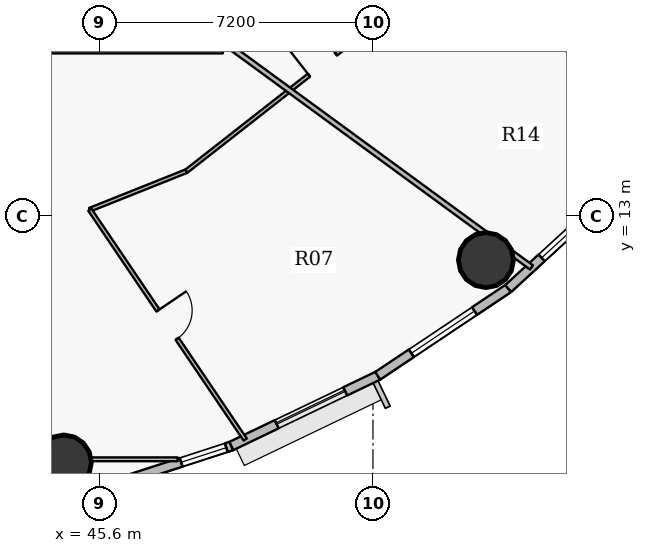
"""IFC4 building model, lengths in metres.
Left out: names, types, materials, properties, quantities, classifications, styles, units other than length and angle.
Written with IfcOpenShell. Run it as: python <this file> out.ifc"""

import sys

from ifc_helpers import new_model, si_unit, direction, frame, frame_2d, origin, origin_2d, place, context, subcontext, project, spatial, rectangle, hollow_circle, extrude, source, transform, mapped, element, fill, save


model = new_model("IFC4")
c1 = context("Model", 3, precision=1e-05, world=origin(), true_north=direction((0.0, 1.0)))
c2 = subcontext(c1, "Body", "Model", "MODEL_VIEW")
j1 = project(units=[si_unit("LENGTHUNIT", "METRE"), si_unit("PLANEANGLEUNIT", "RADIAN")], contexts=[c1])
p1 = place(None, origin())
s1 = spatial("IfcSite", under=j1, at=p1, CompositionType="ELEMENT")
p2 = place(p1, origin())
s2 = spatial("IfcBuilding", under=s1, at=p2, CompositionType="ELEMENT")
p3 = place(p2, frame((0.0, 0.0, 138.45)))
s3 = spatial("IfcBuildingStorey", under=s2, at=p3, CompositionType="ELEMENT", Elevation=138.45)
for number, where, z_axis, x_axis in (
    (1, (44.666, 6.519, 0.0), (0.0, 0.0, 1.0), (1.0, 0.0, 0.0)),
    (2, (55.773, 11.844, 0.0), (0.0, 0.0, 1.0), (1.0, 0.0, 0.0)),
):
    element("IfcColumn", number, at=place(p3, frame(where, z_axis=z_axis, x_axis=x_axis)), inside=s3, PredefinedType="COLUMN", context=c2, shape_type="SweptSolid", body=[
        extrude(hollow_circle(Radius=0.725, WallThickness=0.042, at=origin_2d()), origin(), (0.0, 0.0, 1.0), 3.75),
    ])
p4 = place(p3, frame((49.074, 6.953, 0.0), z_axis=(0.0, 0.0, 1.0), x_axis=(-0.951211346073, -0.308540070495, 0.0)))
e3 = element("IfcWall", 3, at=p4, inside=s3, PredefinedType="SOLIDWALL", context=c2, shape_type="SweptSolid", body=[
    extrude(rectangle(XDim=4.388, YDim=0.24, at=frame_2d((2.194, 0.0))), origin(), (0.0, 0.0, 1.0), 3.5),
])
p5 = place(p4, frame((0.14, 0.0, 0.9)))
e4 = element("IfcOpeningElement", 4, at=p5, cuts=e3, PredefinedType="OPENING", context=c2, shape_type="SweptSolid", body=[
    extrude(rectangle(XDim=1.25, YDim=1.65, at=origin_2d()), frame((0.625, 0.13, 0.825), z_axis=(0.0, -1.0, 0.0), x_axis=(1.0, 0.0, 0.0)), (0.0, 0.0, 1.0), 0.26),
])
p6 = place(p3, frame((52.925, 8.801, 0.0), z_axis=(0.0, 0.0, 1.0), x_axis=(-0.901589935876, -0.432591709962, 0.0)))
e5 = element("IfcWall", 5, at=p6, inside=s3, PredefinedType="SOLIDWALL", context=c2, shape_type="SweptSolid", body=[
    extrude(rectangle(XDim=4.272, YDim=0.24, at=frame_2d((2.136, 0.0))), origin(), (0.0, 0.0, 1.0), 3.5),
])
p7 = place(p6, frame((0.949, 0.0, 0.9)))
e6 = element("IfcOpeningElement", 6, at=p7, cuts=e5, PredefinedType="OPENING", context=c2, shape_type="SweptSolid", body=[
    extrude(rectangle(XDim=2.0, YDim=1.75, at=origin_2d()), frame((1.0, 0.13, 0.875), z_axis=(0.0, -1.0, 0.0), x_axis=(1.0, 0.0, 0.0)), (0.0, 0.0, 1.0), 0.26),
])
p8 = place(p3, frame((56.358, 11.097, 0.0), z_axis=(0.0, 0.0, 1.0), x_axis=(-0.831221811447, -0.555940914284, 0.0)))
e7 = element("IfcWall", 7, at=p8, inside=s3, PredefinedType="SOLIDWALL", context=c2, shape_type="SweptSolid", body=[
    extrude(rectangle(XDim=4.13, YDim=0.24, at=frame_2d((2.065, 0.0))), origin(), (0.0, 0.0, 1.0), 3.5),
])
p9 = place(p8, frame((1.065, 0.0, 0.9)))
e8 = element("IfcOpeningElement", 8, at=p9, cuts=e7, PredefinedType="OPENING", context=c2, shape_type="SweptSolid", body=[
    extrude(rectangle(XDim=2.0, YDim=1.75, at=origin_2d()), frame((1.0, 0.13, 0.875), z_axis=(0.0, -1.0, 0.0), x_axis=(1.0, 0.0, 0.0)), (0.0, 0.0, 1.0), 0.26),
])
p10 = place(p3, frame((59.289, 13.783, 0.0), z_axis=(0.0, 0.0, 1.0), x_axis=(-0.737113356241, -0.675769117414, 0.0)))
e9 = element("IfcWall", 9, at=p10, inside=s3, PredefinedType="SOLIDWALL", context=c2, shape_type="SweptSolid", body=[
    extrude(rectangle(XDim=3.976, YDim=0.24, at=frame_2d((1.988, 0.0))), origin(), (0.0, 0.0, 1.0), 3.5),
])
p11 = place(p10, frame((0.783, 0.0, 0.9)))
e10 = element("IfcOpeningElement", 10, at=p11, cuts=e9, PredefinedType="OPENING", context=c2, shape_type="SweptSolid", body=[
    extrude(rectangle(XDim=2.0, YDim=1.75, at=origin_2d()), frame((1.0, 0.13, 0.875), z_axis=(0.0, -1.0, 0.0), x_axis=(1.0, 0.0, 0.0)), (0.0, 0.0, 1.0), 0.26),
])
p12 = place(p3, frame((38.477, 17.35, 0.0), z_axis=(0.0, 0.0, 1.0), x_axis=(1.0, 0.0, 0.0)))
e11 = element("IfcWall", 11, at=p12, inside=s3, PredefinedType="PARTITIONING", context=c2, shape_type="SweptSolid", body=[
    extrude(rectangle(XDim=10.373, YDim=0.135, at=frame_2d((5.187, 0.0))), origin(), (0.0, 0.0, 1.0), 2.935),
])
p13 = place(p12, frame((4.687, 0.0, 0.0)))
e12 = element("IfcOpeningElement", 12, at=p13, cuts=e11, PredefinedType="OPENING", context=c2, shape_type="SweptSolid", body=[
    extrude(rectangle(XDim=1.0, YDim=2.15, at=origin_2d()), frame((0.5, 0.078, 1.075), z_axis=(0.0, -1.0, 0.0), x_axis=(1.0, 0.0, 0.0)), (0.0, 0.0, 1.0), 0.155),
])
p14 = place(p3, frame((41.208, 6.603, 0.0), z_axis=(0.0, 0.0, 1.0), x_axis=(1.0, 0.0, 0.0)))
e13 = element("IfcWall", 13, at=p14, inside=s3, PredefinedType="PARTITIONING", context=c2, shape_type="SweptSolid", body=[
    extrude(rectangle(XDim=6.453, YDim=0.1, at=frame_2d((3.227, 0.0))), origin(), (0.0, 0.0, 1.0), 2.935),
])
p15 = place(p14, frame((1.183, 0.0, 0.0)))
e14 = element("IfcOpeningElement", 14, at=p15, cuts=e13, PredefinedType="OPENING", context=c2, shape_type="SweptSolid", body=[
    extrude(rectangle(XDim=0.9, YDim=2.1, at=origin_2d()), frame((0.45, 0.06, 1.05), z_axis=(0.0, -1.0, 0.0), x_axis=(1.0, 0.0, 0.0)), (0.0, 0.0, 1.0), 0.12),
])
p16 = place(p3, frame((45.35, 13.17, 0.0), z_axis=(0.0, 0.0, 1.0), x_axis=(0.928802486491, 0.370575149044, 0.0)))
e15 = element("IfcWall", 15, at=p16, inside=s3, PredefinedType="PARTITIONING", context=c2, shape_type="SweptSolid", body=[
    extrude(rectangle(XDim=2.736, YDim=0.1, at=frame_2d((1.368, 0.0))), origin(), (0.0, 0.0, 1.0), 3.5),
])
p17 = place(p3, frame((45.35, 13.17, 0.0), z_axis=(0.0, 0.0, 1.0), x_axis=(0.560082631059, -0.828436748573, 0.0)))
e16 = element("IfcWall", 16, at=p17, inside=s3, PredefinedType="PARTITIONING", context=c2, shape_type="SweptSolid", body=[
    extrude(rectangle(XDim=7.301, YDim=0.1, at=frame_2d((3.65, 0.0))), origin(), (0.0, 0.0, 1.0), 2.935),
])
p18 = place(p17, frame((3.2, 0.0, 0.0)))
e17 = element("IfcOpeningElement", 17, at=p18, cuts=e16, PredefinedType="OPENING", context=c2, shape_type="SweptSolid", body=[
    extrude(rectangle(XDim=0.9, YDim=2.1, at=origin_2d()), frame((0.45, 0.06, 1.05), z_axis=(0.0, -1.0, 0.0), x_axis=(1.0, 0.0, 0.0)), (0.0, 0.0, 1.0), 0.12),
])
p19 = place(p3, frame((47.891, 14.184, 0.0), z_axis=(0.0, 0.0, 1.0), x_axis=(0.787333679705, 0.616527109544, 0.0)))
e18 = element("IfcWall", 18, at=p19, inside=s3, PredefinedType="PARTITIONING", context=c2, shape_type="SweptSolid", body=[
    extrude(rectangle(XDim=5.685, YDim=0.1, at=frame_2d((2.842, 0.0))), origin(), (0.0, 0.0, 1.0), 2.935),
])
p20 = place(p19, frame((4.096, 0.0, 0.0)))
e19 = element("IfcOpeningElement", 19, at=p20, cuts=e18, PredefinedType="OPENING", context=c2, shape_type="SweptSolid", body=[
    extrude(rectangle(XDim=0.9, YDim=2.1, at=origin_2d()), frame((0.45, 0.06, 1.05), z_axis=(0.0, -1.0, 0.0), x_axis=(1.0, 0.0, 0.0)), (0.0, 0.0, 1.0), 0.12),
])
p21 = place(p3, frame((48.85, 17.595, 0.0), z_axis=(0.0, 0.0, 1.0), x_axis=(0.806958414, -0.590608261096, 0.0)))
e20 = element("IfcWall", 20, at=p21, inside=s3, PredefinedType="PARTITIONING", context=c2, shape_type="SweptSolid", body=[
    extrude(rectangle(XDim=10.063, YDim=0.135, at=frame_2d((5.032, 0.0))), origin(), (0.0, 0.0, 1.0), 2.935),
])
p22 = place(p3, frame((53.442, 19.342, 0.0), z_axis=(0.0, 0.0, 1.0), x_axis=(0.91563160904, -0.402018353469, 0.0)))
e21 = element("IfcWall", 21, at=p22, inside=s3, PredefinedType="PARTITIONING", context=c2, shape_type="SweptSolid", body=[
    extrude(rectangle(XDim=8.294, YDim=0.1, at=frame_2d((4.147, 0.0))), origin(), (0.0, 0.0, 1.0), 2.935),
])
m1 = source(origin(), c2, "Body", "SweptSolid", [
    extrude(rectangle(XDim=2.0, YDim=1.75, at=origin_2d()), frame((1.0, 0.03, 0.875), z_axis=(0.0, -1.0, 0.0), x_axis=(1.0, 0.0, 0.0)), (0.0, 0.0, 1.0), 0.06),
])
p23 = place(p7, origin())
e22 = element("IfcWindow", 22, at=p23, inside=s3, PartitioningType="DOUBLE_PANEL_VERTICAL", PredefinedType="WINDOW", context=c2, shape_type="MappedRepresentation", body=[
    mapped(m1, transform((0.0, 0.0, 0.0), x_axis=(1.0, 0.0, 0.0), y_axis=(0.0, 1.0, 0.0), z_axis=(0.0, 0.0, 1.0), scale=1.0)),
])
fill(e6, e22)
p24 = place(p9, origin())
e23 = element("IfcWindow", 23, at=p24, inside=s3, PartitioningType="DOUBLE_PANEL_VERTICAL", PredefinedType="WINDOW", context=c2, shape_type="MappedRepresentation", body=[
    mapped(m1, transform((0.0, 0.0, 0.0), x_axis=(1.0, 0.0, 0.0), y_axis=(0.0, 1.0, 0.0), z_axis=(0.0, 0.0, 1.0), scale=1.0)),
])
fill(e8, e23)
p25 = place(p11, origin())
e24 = element("IfcWindow", 24, at=p25, inside=s3, PartitioningType="DOUBLE_PANEL_VERTICAL", PredefinedType="WINDOW", context=c2, shape_type="MappedRepresentation", body=[
    mapped(m1, transform((0.0, 0.0, 0.0), x_axis=(1.0, 0.0, 0.0), y_axis=(0.0, 1.0, 0.0), z_axis=(0.0, 0.0, 1.0), scale=1.0)),
])
fill(e10, e24)
m2 = source(origin(), c2, "Body", "SweptSolid", [
    extrude(rectangle(XDim=1.25, YDim=1.65, at=origin_2d()), frame((0.625, 0.03, 0.825), z_axis=(0.0, -1.0, 0.0), x_axis=(1.0, 0.0, 0.0)), (0.0, 0.0, 1.0), 0.06),
])
p26 = place(p5, origin())
e25 = element("IfcWindow", 25, at=p26, inside=s3, PartitioningType="SINGLE_PANEL", PredefinedType="WINDOW", context=c2, shape_type="MappedRepresentation", body=[
    mapped(m2, transform((0.0, 0.0, 0.0), x_axis=(1.0, 0.0, 0.0), y_axis=(0.0, 1.0, 0.0), z_axis=(0.0, 0.0, 1.0), scale=1.0)),
])
fill(e4, e25)
m3 = source(origin(), c2, "Body", "SweptSolid", [
    extrude(rectangle(XDim=0.9, YDim=2.1, at=origin_2d()), frame((0.45, 0.025, 1.05), z_axis=(0.0, -1.0, 0.0), x_axis=(1.0, 0.0, 0.0)), (0.0, 0.0, 1.0), 0.05),
])
p27 = place(p18, origin())
e26 = element("IfcDoor", 26, at=p27, inside=s3, OperationType="SINGLE_SWING_LEFT", PredefinedType="DOOR", context=c2, shape_type="MappedRepresentation", body=[
    mapped(m3, transform((0.0, 0.0, 0.0), x_axis=(1.0, 0.0, 0.0), y_axis=(0.0, 1.0, 0.0), z_axis=(0.0, 0.0, 1.0), scale=1.0)),
])
fill(e17, e26)
p28 = place(p20, origin())
e27 = element("IfcDoor", 27, at=p28, inside=s3, OperationType="SINGLE_SWING_LEFT", PredefinedType="DOOR", context=c2, shape_type="MappedRepresentation", body=[
    mapped(m3, transform((0.0, 0.0, 0.0), x_axis=(1.0, 0.0, 0.0), y_axis=(0.0, 1.0, 0.0), z_axis=(0.0, 0.0, 1.0), scale=1.0)),
])
fill(e19, e27)
save(model, sys.argv[1])
